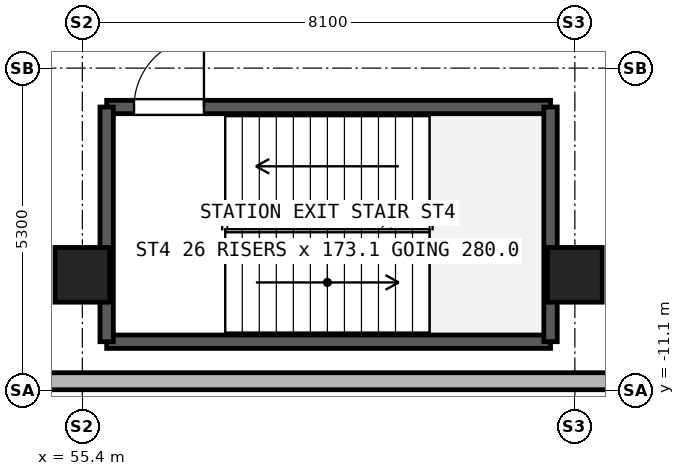
"""IFC4 building model, lengths in metres.
Left out: names, types, materials, properties, quantities, classifications, styles, units other than length and angle.
Written with IfcOpenShell. Run it as: python <this file> out.ifc"""

import sys

from ifc_helpers import new_model, si_unit, direction, frame, frame_2d, origin, origin_2d, place, context, subcontext, project, spatial, rectangle, hollow_rectangle, extrude, source, transform, mapped, element, fill, save


model = new_model("IFC4")
c1 = context("Model", 3, precision=1e-05, world=origin(), true_north=direction((0.0, 1.0)))
c2 = subcontext(c1, "Body", "Model", "MODEL_VIEW")
j1 = project(units=[si_unit("LENGTHUNIT", "METRE"), si_unit("PLANEANGLEUNIT", "RADIAN")], contexts=[c1])
p1 = place(None, origin())
s1 = spatial("IfcSite", under=j1, at=p1, CompositionType="ELEMENT")
p2 = place(p1, origin())
s2 = spatial("IfcBuilding", under=s1, at=p2, CompositionType="ELEMENT")
p3 = place(p2, frame((0.0, 0.0, 4.5)))
s3 = spatial("IfcBuildingStorey", under=s2, at=p3, CompositionType="ELEMENT", Elevation=4.5)
m1 = source(origin(), c2, "Body", "SweptSolid", [
    extrude(hollow_rectangle(XDim=0.7, YDim=0.9, WallThickness=0.04, at=origin_2d()), origin(), (0.0, 0.0, 1.0), 4.18),
])
for number, where, z_axis, x_axis in (
    (1, (55.4, -9.2, 0.0), (0.0, 0.0, 1.0), (1.0, 0.0, 0.0)),
    (2, (63.5, -9.2, 0.0), (0.0, 0.0, 1.0), (1.0, 0.0, 0.0)),
):
    element("IfcColumn", number, at=place(p3, frame(where, z_axis=z_axis, x_axis=x_axis)), inside=s3, PredefinedType="COLUMN", context=c2, shape_type="MappedRepresentation", body=[
        mapped(m1, transform((0.0, 0.0, 0.0), x_axis=(1.0, 0.0, 0.0), y_axis=(0.0, 1.0, 0.0), z_axis=(0.0, 0.0, 1.0), scale=1.0)),
    ])
p4 = place(p3, frame((41.9, -10.95, 0.0), z_axis=(0.0, 0.0, 1.0), x_axis=(1.0, 0.0, 0.0)))
e3 = element("IfcWall", 3, at=p4, inside=s3, PredefinedType="SOLIDWALL", context=c2, shape_type="SweptSolid", body=[
    extrude(rectangle(XDim=29.55, YDim=0.28, at=frame_2d((14.775, 0.0))), origin(), (0.0, 0.0, 1.0), 4.18),
])
p5 = place(p4, frame((6.3, 0.0, 1.1)))
e4 = element("IfcOpeningElement", 4, at=p5, cuts=e3, PredefinedType="OPENING", context=c2, shape_type="SweptSolid", body=[
    extrude(rectangle(XDim=1.6, YDim=1.4, at=frame_2d((0.8, 0.7))), frame((0.0, 0.15, 0.0), z_axis=(0.0, -1.0, 0.0), x_axis=(1.0, 0.0, 0.0)), (0.0, 0.0, 1.0), 0.3),
])
p6 = place(p3, frame((55.8, -10.3, 0.0), z_axis=(0.0, 0.0, 1.0), x_axis=(1.0, 0.0, 0.0)))
e5 = element("IfcWall", 5, at=p6, inside=s3, PredefinedType="SOLIDWALL", context=c2, shape_type="SweptSolid", body=[
    extrude(rectangle(XDim=7.3, YDim=0.22, at=frame_2d((3.65, 0.0))), origin(), (0.0, 0.0, 1.0), 4.18),
])
p7 = place(p3, frame((55.8, -6.44, 0.0), z_axis=(0.0, 0.0, 1.0), x_axis=(1.0, 0.0, 0.0)))
e6 = element("IfcWall", 6, at=p7, inside=s3, PredefinedType="SOLIDWALL", context=c2, shape_type="SweptSolid", body=[
    extrude(rectangle(XDim=7.3, YDim=0.22, at=frame_2d((3.65, 0.0))), origin(), (0.0, 0.0, 1.0), 4.18),
])
p8 = place(p7, frame((0.45, 0.0, 0.0)))
e7 = element("IfcOpeningElement", 7, at=p8, cuts=e6, PredefinedType="OPENING", context=c2, shape_type="SweptSolid", body=[
    extrude(rectangle(XDim=1.15, YDim=2.2, at=frame_2d((0.575, 1.1))), frame((0.0, 0.12, 0.0), z_axis=(0.0, -1.0, 0.0), x_axis=(1.0, 0.0, 0.0)), (0.0, 0.0, 1.0), 0.24),
])
for number, where, z_axis, x_axis in (
    (8, (55.8, -10.3, 0.0), (0.0, 0.0, 1.0), (0.0, 1.0, 0.0)),
    (9, (63.1, -10.3, 0.0), (0.0, 0.0, 1.0), (0.0, 1.0, 0.0)),
):
    element("IfcWall", number, at=place(p3, frame(where, z_axis=z_axis, x_axis=x_axis)), inside=s3, PredefinedType="SOLIDWALL", context=c2, shape_type="SweptSolid", body=[
        extrude(rectangle(XDim=3.86, YDim=0.22, at=frame_2d((1.93, 0.0))), origin(), (0.0, 0.0, 1.0), 4.18),
    ])
p9 = place(p8, origin())
e10 = element("IfcDoor", 10, at=p9, inside=s3, OperationType="SINGLE_SWING_RIGHT", PredefinedType="DOOR", context=c2, shape_type="SweptSolid", body=[
    extrude(rectangle(XDim=1.15, YDim=2.2, at=frame_2d((0.575, 1.1))), frame((0.0, 0.025, 0.0), z_axis=(0.0, -1.0, 0.0), x_axis=(1.0, 0.0, 0.0)), (0.0, 0.0, 1.0), 0.05),
])
fill(e7, e10)
save(model, sys.argv[1])
